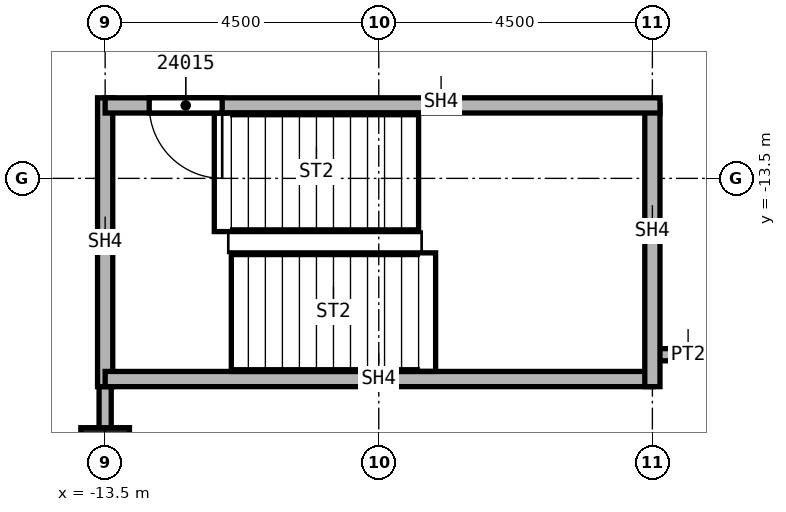
"""IFC4 building model, lengths in metres.
Left out: names, types, materials, properties, quantities, classifications, styles, units other than length and angle.
Written with IfcOpenShell. Run it as: python <this file> out.ifc"""

import sys

from ifc_helpers import new_model, si_unit, direction, frame, frame_2d, origin, origin_2d, place, context, subcontext, project, spatial, rectangle, extrude, element, fill, save


model = new_model("IFC4")
c1 = context("Model", 3, precision=1e-05, world=origin(), true_north=direction((0.0, 1.0)))
c2 = subcontext(c1, "Body", "Model", "MODEL_VIEW")
j1 = project(units=[si_unit("LENGTHUNIT", "METRE"), si_unit("PLANEANGLEUNIT", "RADIAN")], contexts=[c1])
p1 = place(None, origin())
s1 = spatial("IfcSite", under=j1, at=p1, CompositionType="ELEMENT")
p2 = place(p1, origin())
s2 = spatial("IfcBuilding", under=s1, at=p2, CompositionType="ELEMENT")
p3 = place(p2, frame((0.0, 0.0, 346.0)))
s3 = spatial("IfcBuildingStorey", under=s2, at=p3, CompositionType="ELEMENT", Elevation=346.0)
p4 = place(p3, frame((-13.5, -18.0, 0.0), z_axis=(0.0, 0.0, 1.0), x_axis=(1.0, 0.0, 0.0)))
e1 = element("IfcColumn", 1, at=p4, inside=s3, PredefinedType="COLUMN", context=c2, shape_type="SweptSolid", body=[
    extrude(rectangle(XDim=0.8, YDim=0.8, at=origin_2d()), origin(), (0.0, 0.0, 1.0), 3.59),
])
p5 = place(p3, frame((-13.5, -16.675, 0.0), z_axis=(0.0, 0.0, 1.0), x_axis=(0.0, -1.0, 0.0)))
e2 = element("IfcWall", 2, at=p5, inside=s3, PredefinedType="PARTITIONING", context=c2, shape_type="SweptSolid", body=[
    extrude(rectangle(XDim=8.275, YDim=0.2, at=frame_2d((4.137, 0.0))), origin(), (0.0, 0.0, 1.0), 3.59),
])
p6 = place(p5, frame((2.2, 0.0, 0.0)))
e3 = element("IfcOpeningElement", 3, at=p6, cuts=e2, PredefinedType="OPENING", context=c2, shape_type="SweptSolid", body=[
    extrude(rectangle(XDim=1.0, YDim=2.1, at=frame_2d((0.5, 1.05))), frame((0.0, 0.1, 0.0), z_axis=(0.0, -1.0, 0.0), x_axis=(1.0, 0.0, 0.0)), (0.0, 0.0, 1.0), 0.2),
])
p7 = place(p3, frame((-3.45, -16.4, 0.0), z_axis=(0.0, 0.0, 1.0), x_axis=(-1.0, 0.0, 0.0)))
e4 = element("IfcWall", 4, at=p7, inside=s3, PredefinedType="PARTITIONING", context=c2, shape_type="SweptSolid", body=[
    extrude(rectangle(XDim=1.05, YDim=0.2, at=frame_2d((0.525, 0.0))), origin(), (0.0, 0.0, 1.0), 3.59),
])
p8 = place(p3, frame((-13.5, -12.175, 0.0), z_axis=(0.0, 0.0, 1.0), x_axis=(0.0, -1.0, 0.0)))
e5 = element("IfcWall", 5, at=p8, inside=s3, PredefinedType="SOLIDWALL", context=c2, shape_type="SweptSolid", body=[
    extrude(rectangle(XDim=4.75, YDim=0.25, at=frame_2d((2.375, 0.0))), origin(), (0.0, 0.0, 1.0), 3.59),
])
p9 = place(p3, frame((-4.5, -16.8, 0.0), z_axis=(0.0, 0.0, 1.0), x_axis=(-1.0, 0.0, 0.0)))
e6 = element("IfcWall", 6, at=p9, inside=s3, PredefinedType="SOLIDWALL", context=c2, shape_type="SweptSolid", body=[
    extrude(rectangle(XDim=9.0, YDim=0.25, at=frame_2d((4.5, 0.0))), origin(), (0.0, 0.0, 1.0), 3.59),
])
p10 = place(p3, frame((-4.5, -12.3, 0.0), z_axis=(0.0, 0.0, 1.0), x_axis=(0.0, -1.0, 0.0)))
e7 = element("IfcWall", 7, at=p10, inside=s3, PredefinedType="SOLIDWALL", context=c2, shape_type="SweptSolid", body=[
    extrude(rectangle(XDim=4.625, YDim=0.25, at=frame_2d((2.312, 0.0))), origin(), (0.0, 0.0, 1.0), 3.59),
])
p11 = place(p3, frame((-4.375, -12.3, 0.0), z_axis=(0.0, 0.0, 1.0), x_axis=(-1.0, 0.0, 0.0)))
e8 = element("IfcWall", 8, at=p11, inside=s3, PredefinedType="SOLIDWALL", context=c2, shape_type="SweptSolid", body=[
    extrude(rectangle(XDim=9.125, YDim=0.25, at=frame_2d((4.562, 0.0))), origin(), (0.0, 0.0, 1.0), 3.59),
])
p12 = place(p11, frame((7.2, 0.0, 0.0)))
e9 = element("IfcOpeningElement", 9, at=p12, cuts=e8, PredefinedType="OPENING", context=c2, shape_type="SweptSolid", body=[
    extrude(rectangle(XDim=1.2, YDim=2.1, at=frame_2d((0.6, 1.05))), frame((0.0, 0.125, 0.0), z_axis=(0.0, -1.0, 0.0), x_axis=(1.0, 0.0, 0.0)), (0.0, 0.0, 1.0), 0.25),
])
p13 = place(p12, origin())
e10 = element("IfcDoor", 10, at=p13, inside=s3, OperationType="SINGLE_SWING_RIGHT", PredefinedType="DOOR", context=c2, shape_type="SweptSolid", body=[
    extrude(rectangle(XDim=1.2, YDim=2.1, at=frame_2d((0.6, 1.05))), frame((0.0, 0.025, 0.0), z_axis=(0.0, -1.0, 0.0), x_axis=(1.0, 0.0, 0.0)), (0.0, 0.0, 1.0), 0.05),
])
fill(e9, e10)
save(model, sys.argv[1])
